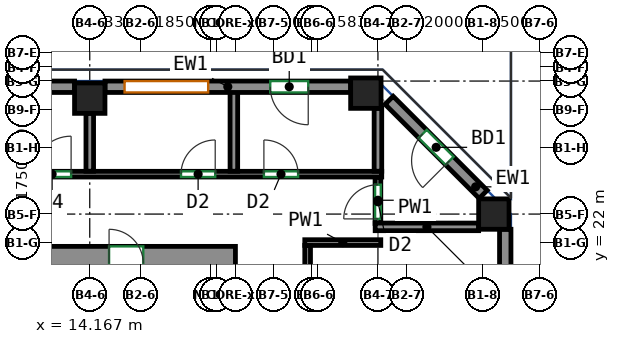
"""IFC4 building model, lengths in metres.
Left out: names, types, materials, properties, quantities, classifications, styles, units other than length and angle.
Written with IfcOpenShell. Run it as: python <this file> out.ifc"""

import sys

from ifc_helpers import new_model, si_unit, direction, frame, frame_2d, origin, origin_2d, place, context, subcontext, project, spatial, rectangle, extrude, source, transform, mapped, element, fill, save


model = new_model("IFC4")
c1 = context("Model", 3, precision=1e-05, world=origin(), true_north=direction((0.0, 1.0)))
c2 = subcontext(c1, "Body", "Model", "MODEL_VIEW")
j1 = project(units=[si_unit("LENGTHUNIT", "METRE"), si_unit("PLANEANGLEUNIT", "RADIAN")], contexts=[c1])
p1 = place(None, origin())
s1 = spatial("IfcSite", under=j1, at=p1, CompositionType="ELEMENT")
p2 = place(p1, origin())
s2 = spatial("IfcBuilding", under=s1, at=p2, CompositionType="ELEMENT")
p3 = place(p2, frame((0.0, 0.0, 168.5)))
s3 = spatial("IfcBuildingStorey", under=s2, at=p3, CompositionType="ELEMENT", Elevation=168.5)
m1 = source(origin(), c2, "Body", "SweptSolid", [
    extrude(rectangle(XDim=0.8, YDim=0.8, at=origin_2d()), origin(), (0.0, 0.0, 1.0), 3.12),
])
for number, where, z_axis, x_axis in (
    (1, (14.167, 25.8, 0.0), (0.0, 0.0, 1.0), (1.0, 0.0, 0.0)),
    (2, (21.432, 25.932, 0.0), (0.0, 0.0, 1.0), (1.0, 0.0, 0.0)),
    (3, (24.8, 22.75, 0.0), (0.0, 0.0, 1.0), (1.0, 0.0, 0.0)),
):
    element("IfcColumn", number, at=place(p3, frame(where, z_axis=z_axis, x_axis=x_axis)), inside=s3, PredefinedType="COLUMN", context=c2, shape_type="MappedRepresentation", body=[
        mapped(m1, transform((0.0, 0.0, 0.0))),
    ])
m2 = source(origin(), c2, "Body", "SweptSolid", [
    extrude(rectangle(XDim=33.9, YDim=0.9, at=frame_2d((16.95, 0.0))), origin(), (0.0, 0.0, 1.0), 3.12),
])
p4 = place(p3, frame((-15.9, 21.45, 0.0), z_axis=(0.0, 0.0, 1.0), x_axis=(1.0, 0.0, 0.0)))
e4 = element("IfcWall", 4, at=p4, inside=s3, PredefinedType="SHEAR", context=c2, shape_type="MappedRepresentation", body=[
    mapped(m2, transform((0.0, 0.0, 0.0))),
])
p5 = place(p4, frame((8.42, 0.0, 0.0)))
e5 = element("IfcOpeningElement", 5, at=p5, cuts=e4, PredefinedType="OPENING", context=c2, shape_type="SweptSolid", body=[
    extrude(rectangle(XDim=0.9, YDim=2.1, at=frame_2d((0.45, 1.05))), frame((0.0, 0.46, 0.0), z_axis=(0.0, -1.0, 0.0), x_axis=(1.0, 0.0, 0.0)), (0.0, 0.0, 1.0), 0.92),
])
p6 = place(p4, frame((15.12, 0.0, 0.0)))
e6 = element("IfcOpeningElement", 6, at=p6, cuts=e4, PredefinedType="OPENING", context=c2, shape_type="SweptSolid", body=[
    extrude(rectangle(XDim=0.9, YDim=2.1, at=frame_2d((0.45, 1.05))), frame((0.0, 0.46, 0.0), z_axis=(0.0, -1.0, 0.0), x_axis=(1.0, 0.0, 0.0)), (0.0, 0.0, 1.0), 0.92),
])
p7 = place(p4, frame((19.944, 0.0, 0.0)))
e7 = element("IfcOpeningElement", 7, at=p7, cuts=e4, PredefinedType="OPENING", context=c2, shape_type="SweptSolid", body=[
    extrude(rectangle(XDim=0.9, YDim=2.1, at=frame_2d((0.45, 1.05))), frame((0.0, 0.46, 0.0), z_axis=(0.0, -1.0, 0.0), x_axis=(1.0, 0.0, 0.0)), (0.0, 0.0, 1.0), 0.92),
])
p8 = place(p4, frame((25.304, 0.0, 0.0)))
e8 = element("IfcOpeningElement", 8, at=p8, cuts=e4, PredefinedType="OPENING", context=c2, shape_type="SweptSolid", body=[
    extrude(rectangle(XDim=0.9, YDim=2.1, at=frame_2d((0.45, 1.05))), frame((0.0, 0.46, 0.0), z_axis=(0.0, -1.0, 0.0), x_axis=(1.0, 0.0, 0.0)), (0.0, 0.0, 1.0), 0.92),
])
p9 = place(p4, frame((2.425, 0.0, 0.0)))
e9 = element("IfcOpeningElement", 9, at=p9, cuts=e4, PredefinedType="OPENING", context=c2, shape_type="SweptSolid", body=[
    extrude(rectangle(XDim=0.9, YDim=2.1, at=frame_2d((0.45, 1.05))), frame((0.0, 0.46, 0.0), z_axis=(0.0, -1.0, 0.0), x_axis=(1.0, 0.0, 0.0)), (0.0, 0.0, 1.0), 0.92),
])
p10 = place(p4, frame((30.575, 0.0, 0.0)))
e10 = element("IfcOpeningElement", 10, at=p10, cuts=e4, PredefinedType="OPENING", context=c2, shape_type="SweptSolid", body=[
    extrude(rectangle(XDim=0.9, YDim=2.1, at=frame_2d((0.45, 1.05))), frame((0.0, 0.46, 0.0), z_axis=(0.0, -1.0, 0.0), x_axis=(1.0, 0.0, 0.0)), (0.0, 0.0, 1.0), 0.92),
])
m3 = source(origin(), c2, "Body", "SweptSolid", [
    extrude(rectangle(XDim=13.95, YDim=0.3, at=frame_2d((6.975, 0.0))), origin(), (0.0, 0.0, 1.0), 3.12),
])
p11 = place(p3, frame((25.1, 8.4, 0.0), z_axis=(0.0, 0.0, 1.0), x_axis=(0.0, 1.0, 0.0)))
e11 = element("IfcWall", 11, at=p11, inside=s3, PredefinedType="SOLIDWALL", context=c2, shape_type="MappedRepresentation", body=[
    mapped(m3, transform((0.0, 0.0, 0.0))),
])
p12 = place(p11, frame((0.994, 0.0, 0.85)))
e12 = element("IfcOpeningElement", 12, at=p12, cuts=e11, PredefinedType="OPENING", context=c2, shape_type="SweptSolid", body=[
    extrude(rectangle(XDim=1.5, YDim=1.95, at=frame_2d((0.75, 0.975))), frame((0.0, 0.16, 0.0), z_axis=(0.0, -1.0, 0.0), x_axis=(1.0, 0.0, 0.0)), (0.0, 0.0, 1.0), 0.32),
])
p13 = place(p11, frame((4.481, 0.0, 0.85)))
e13 = element("IfcOpeningElement", 13, at=p13, cuts=e11, PredefinedType="OPENING", context=c2, shape_type="SweptSolid", body=[
    extrude(rectangle(XDim=1.5, YDim=1.95, at=frame_2d((0.75, 0.975))), frame((0.0, 0.16, 0.0), z_axis=(0.0, -1.0, 0.0), x_axis=(1.0, 0.0, 0.0)), (0.0, 0.0, 1.0), 0.32),
])
p14 = place(p11, frame((7.969, 0.0, 0.85)))
e14 = element("IfcOpeningElement", 14, at=p14, cuts=e11, PredefinedType="OPENING", context=c2, shape_type="SweptSolid", body=[
    extrude(rectangle(XDim=1.5, YDim=1.95, at=frame_2d((0.75, 0.975))), frame((0.0, 0.16, 0.0), z_axis=(0.0, -1.0, 0.0), x_axis=(1.0, 0.0, 0.0)), (0.0, 0.0, 1.0), 0.32),
])
p15 = place(p11, frame((11.456, 0.0, 0.85)))
e15 = element("IfcOpeningElement", 15, at=p15, cuts=e11, PredefinedType="OPENING", context=c2, shape_type="SweptSolid", body=[
    extrude(rectangle(XDim=1.5, YDim=1.95, at=frame_2d((0.75, 0.975))), frame((0.0, 0.16, 0.0), z_axis=(0.0, -1.0, 0.0), x_axis=(1.0, 0.0, 0.0)), (0.0, 0.0, 1.0), 0.32),
])
m4 = source(origin(), c2, "Body", "SweptSolid", [
    extrude(rectangle(XDim=3.5, YDim=0.3, at=frame_2d((1.75, 0.0))), origin(), (0.0, 0.0, 1.0), 3.12),
])
p16 = place(p3, frame((24.519, 23.269, 0.0), z_axis=(0.0, 0.0, 1.0), x_axis=(-0.70707190453, 0.707141656123, 0.0)))
e16 = element("IfcWall", 16, at=p16, inside=s3, PredefinedType="SOLIDWALL", context=c2, shape_type="MappedRepresentation", body=[
    mapped(m4, transform((0.0, 0.0, 0.0))),
])
p17 = place(p16, frame((1.25, 0.0, 0.0)))
e17 = element("IfcOpeningElement", 17, at=p17, cuts=e16, PredefinedType="OPENING", context=c2, shape_type="SweptSolid", body=[
    extrude(rectangle(XDim=1.0, YDim=2.1, at=frame_2d((0.5, 1.05))), frame((0.0, 0.16, 0.0), z_axis=(0.0, -1.0, 0.0), x_axis=(1.0, 0.0, 0.0)), (0.0, 0.0, 1.0), 0.32),
])
m5 = source(origin(), c2, "Body", "SweptSolid", [
    extrude(rectangle(XDim=6.465, YDim=0.3, at=frame_2d((3.232, 0.0))), origin(), (0.0, 0.0, 1.0), 3.12),
])
p18 = place(p3, frame((21.032, 26.1, 0.0), z_axis=(0.0, 0.0, 1.0), x_axis=(-1.0, 0.0, 0.0)))
e18 = element("IfcWall", 18, at=p18, inside=s3, PredefinedType="SOLIDWALL", context=c2, shape_type="MappedRepresentation", body=[
    mapped(m5, transform((0.0, 0.0, 0.0))),
])
p19 = place(p18, frame((1.116, 0.0, 0.0)))
e19 = element("IfcOpeningElement", 19, at=p19, cuts=e18, PredefinedType="OPENING", context=c2, shape_type="SweptSolid", body=[
    extrude(rectangle(XDim=1.0, YDim=2.1, at=frame_2d((0.5, 1.05))), frame((0.0, 0.16, 0.0), z_axis=(0.0, -1.0, 0.0), x_axis=(1.0, 0.0, 0.0)), (0.0, 0.0, 1.0), 0.32),
])
p20 = place(p18, frame((3.749, 0.0, 0.85)))
e20 = element("IfcOpeningElement", 20, at=p20, cuts=e18, PredefinedType="OPENING", context=c2, shape_type="SweptSolid", body=[
    extrude(rectangle(XDim=2.2, YDim=1.95, at=frame_2d((1.1, 0.975))), frame((0.0, 0.16, 0.0), z_axis=(0.0, -1.0, 0.0), x_axis=(1.0, 0.0, 0.0)), (0.0, 0.0, 1.0), 0.32),
])
m6 = source(origin(), c2, "Body", "SweptSolid", [
    extrude(rectangle(XDim=6.783, YDim=0.3, at=frame_2d((3.392, 0.0))), origin(), (0.0, 0.0, 1.0), 3.12),
])
p21 = place(p3, frame((13.767, 26.1, 0.0), z_axis=(0.0, 0.0, 1.0), x_axis=(-1.0, 0.0, 0.0)))
e21 = element("IfcWall", 21, at=p21, inside=s3, PredefinedType="SOLIDWALL", context=c2, shape_type="MappedRepresentation", body=[
    mapped(m6, transform((0.0, 0.0, 0.0))),
])
p22 = place(p21, frame((1.196, 0.0, 0.0)))
e22 = element("IfcOpeningElement", 22, at=p22, cuts=e21, PredefinedType="OPENING", context=c2, shape_type="SweptSolid", body=[
    extrude(rectangle(XDim=1.0, YDim=2.1, at=frame_2d((0.5, 1.05))), frame((0.0, 0.16, 0.0), z_axis=(0.0, -1.0, 0.0), x_axis=(1.0, 0.0, 0.0)), (0.0, 0.0, 1.0), 0.32),
])
p23 = place(p21, frame((3.988, 0.0, 0.85)))
e23 = element("IfcOpeningElement", 23, at=p23, cuts=e21, PredefinedType="OPENING", context=c2, shape_type="SweptSolid", body=[
    extrude(rectangle(XDim=2.2, YDim=1.95, at=frame_2d((1.1, 0.975))), frame((0.0, 0.16, 0.0), z_axis=(0.0, -1.0, 0.0), x_axis=(1.0, 0.0, 0.0)), (0.0, 0.0, 1.0), 0.32),
])
p24 = place(p3, frame((19.825, 22.0, 0.0), z_axis=(0.0, 0.0, 1.0), x_axis=(1.0, 0.0, 0.0)))
e24 = element("IfcWall", 24, at=p24, inside=s3, PredefinedType="PARTITIONING", context=c2, shape_type="SweptSolid", body=[
    extrude(rectangle(XDim=2.0, YDim=0.15, at=frame_2d((1.0, 0.0))), origin(), (0.0, 0.0, 1.0), 3.12),
])
p25 = place(p3, frame((19.9, 17.75, 0.0), z_axis=(0.0, 0.0, 1.0), x_axis=(0.0, 1.0, 0.0)))
e25 = element("IfcWall", 25, at=p25, inside=s3, PredefinedType="PARTITIONING", context=c2, shape_type="SweptSolid", body=[
    extrude(rectangle(XDim=4.175, YDim=0.15, at=frame_2d((2.087, 0.0))), origin(), (0.0, 0.0, 1.0), 3.12),
])
p26 = place(p25, frame((1.432, 0.0, 0.0)))
e26 = element("IfcOpeningElement", 26, at=p26, cuts=e25, PredefinedType="OPENING", context=c2, shape_type="SweptSolid", body=[
    extrude(rectangle(XDim=0.9, YDim=2.1, at=frame_2d((0.45, 1.05))), frame((0.0, 0.085, 0.0), z_axis=(0.0, -1.0, 0.0), x_axis=(1.0, 0.0, 0.0)), (0.0, 0.0, 1.0), 0.17),
])
p27 = place(p3, frame((21.75, 22.503, 0.0), z_axis=(0.0, 0.0, 1.0), x_axis=(0.0, 1.0, 0.0)))
e27 = element("IfcWall", 27, at=p27, inside=s3, PredefinedType="PARTITIONING", context=c2, shape_type="SweptSolid", body=[
    extrude(rectangle(XDim=1.222, YDim=0.15, at=frame_2d((0.611, 0.0))), origin(), (0.0, 0.0, 1.0), 3.12),
])
p28 = place(p27, frame((0.12, 0.0, 0.0)))
e28 = element("IfcOpeningElement", 28, at=p28, cuts=e27, PredefinedType="OPENING", context=c2, shape_type="SweptSolid", body=[
    extrude(rectangle(XDim=0.9, YDim=2.1, at=frame_2d((0.45, 1.05))), frame((0.0, 0.085, 0.0), z_axis=(0.0, -1.0, 0.0), x_axis=(1.0, 0.0, 0.0)), (0.0, 0.0, 1.0), 0.17),
])
p29 = place(p3, frame((-20.059, 23.8, 0.0), z_axis=(0.0, 0.0, 1.0), x_axis=(1.0, 0.0, 0.0)))
e29 = element("IfcWall", 29, at=p29, inside=s3, PredefinedType="PARTITIONING", context=c2, shape_type="SweptSolid", body=[
    extrude(rectangle(XDim=41.909, YDim=0.15, at=frame_2d((20.955, 0.0))), origin(), (0.0, 0.0, 1.0), 3.12),
])
p30 = place(p29, frame((2.101, 0.0, 0.0)))
e30 = element("IfcOpeningElement", 30, at=p30, cuts=e29, PredefinedType="OPENING", context=c2, shape_type="SweptSolid", body=[
    extrude(rectangle(XDim=0.9, YDim=2.1, at=frame_2d((0.45, 1.05))), frame((0.0, 0.085, 0.0), z_axis=(0.0, -1.0, 0.0), x_axis=(1.0, 0.0, 0.0)), (0.0, 0.0, 1.0), 0.17),
])
p31 = place(p29, frame((4.585, 0.0, 0.0)))
e31 = element("IfcOpeningElement", 31, at=p31, cuts=e29, PredefinedType="OPENING", context=c2, shape_type="SweptSolid", body=[
    extrude(rectangle(XDim=1.0, YDim=2.1, at=frame_2d((0.5, 1.05))), frame((0.0, 0.085, 0.0), z_axis=(0.0, -1.0, 0.0), x_axis=(1.0, 0.0, 0.0)), (0.0, 0.0, 1.0), 0.17),
])
p32 = place(p29, frame((8.175, 0.0, 0.0)))
e32 = element("IfcOpeningElement", 32, at=p32, cuts=e29, PredefinedType="OPENING", context=c2, shape_type="SweptSolid", body=[
    extrude(rectangle(XDim=0.9, YDim=2.1, at=frame_2d((0.45, 1.05))), frame((0.0, 0.085, 0.0), z_axis=(0.0, -1.0, 0.0), x_axis=(1.0, 0.0, 0.0)), (0.0, 0.0, 1.0), 0.17),
])
p33 = place(p29, frame((13.173, 0.0, 0.0)))
e33 = element("IfcOpeningElement", 33, at=p33, cuts=e29, PredefinedType="OPENING", context=c2, shape_type="SweptSolid", body=[
    extrude(rectangle(XDim=1.0, YDim=2.1, at=frame_2d((0.5, 1.05))), frame((0.0, 0.085, 0.0), z_axis=(0.0, -1.0, 0.0), x_axis=(1.0, 0.0, 0.0)), (0.0, 0.0, 1.0), 0.17),
])
p34 = place(p29, frame((15.658, 0.0, 0.0)))
e34 = element("IfcOpeningElement", 34, at=p34, cuts=e29, PredefinedType="OPENING", context=c2, shape_type="SweptSolid", body=[
    extrude(rectangle(XDim=0.9, YDim=2.1, at=frame_2d((0.45, 1.05))), frame((0.0, 0.085, 0.0), z_axis=(0.0, -1.0, 0.0), x_axis=(1.0, 0.0, 0.0)), (0.0, 0.0, 1.0), 0.17),
])
p35 = place(p29, frame((21.315, 0.0, 0.0)))
e35 = element("IfcOpeningElement", 35, at=p35, cuts=e29, PredefinedType="OPENING", context=c2, shape_type="SweptSolid", body=[
    extrude(rectangle(XDim=0.9, YDim=2.1, at=frame_2d((0.45, 1.05))), frame((0.0, 0.085, 0.0), z_axis=(0.0, -1.0, 0.0), x_axis=(1.0, 0.0, 0.0)), (0.0, 0.0, 1.0), 0.17),
])
p36 = place(p29, frame((24.625, 0.0, 0.0)))
e36 = element("IfcOpeningElement", 36, at=p36, cuts=e29, PredefinedType="OPENING", context=c2, shape_type="SweptSolid", body=[
    extrude(rectangle(XDim=1.0, YDim=2.1, at=frame_2d((0.5, 1.05))), frame((0.0, 0.085, 0.0), z_axis=(0.0, -1.0, 0.0), x_axis=(1.0, 0.0, 0.0)), (0.0, 0.0, 1.0), 0.17),
])
p37 = place(p29, frame((29.043, 0.0, 0.0)))
e37 = element("IfcOpeningElement", 37, at=p37, cuts=e29, PredefinedType="OPENING", context=c2, shape_type="SweptSolid", body=[
    extrude(rectangle(XDim=0.9, YDim=2.1, at=frame_2d((0.45, 1.05))), frame((0.0, 0.085, 0.0), z_axis=(0.0, -1.0, 0.0), x_axis=(1.0, 0.0, 0.0)), (0.0, 0.0, 1.0), 0.17),
])
p38 = place(p29, frame((32.735, 0.0, 0.0)))
e38 = element("IfcOpeningElement", 38, at=p38, cuts=e29, PredefinedType="OPENING", context=c2, shape_type="SweptSolid", body=[
    extrude(rectangle(XDim=1.0, YDim=2.1, at=frame_2d((0.5, 1.05))), frame((0.0, 0.085, 0.0), z_axis=(0.0, -1.0, 0.0), x_axis=(1.0, 0.0, 0.0)), (0.0, 0.0, 1.0), 0.17),
])
p39 = place(p29, frame((36.627, 0.0, 0.0)))
e39 = element("IfcOpeningElement", 39, at=p39, cuts=e29, PredefinedType="OPENING", context=c2, shape_type="SweptSolid", body=[
    extrude(rectangle(XDim=0.9, YDim=2.1, at=frame_2d((0.45, 1.05))), frame((0.0, 0.085, 0.0), z_axis=(0.0, -1.0, 0.0), x_axis=(1.0, 0.0, 0.0)), (0.0, 0.0, 1.0), 0.17),
])
p40 = place(p29, frame((38.808, 0.0, 0.0)))
e40 = element("IfcOpeningElement", 40, at=p40, cuts=e29, PredefinedType="OPENING", context=c2, shape_type="SweptSolid", body=[
    extrude(rectangle(XDim=0.9, YDim=2.1, at=frame_2d((0.45, 1.05))), frame((0.0, 0.085, 0.0), z_axis=(0.0, -1.0, 0.0), x_axis=(1.0, 0.0, 0.0)), (0.0, 0.0, 1.0), 0.17),
])
p41 = place(p3, frame((24.4, 22.413, 0.0), z_axis=(0.0, 0.0, 1.0), x_axis=(-1.0, 0.0, 0.0)))
e41 = element("IfcWall", 41, at=p41, inside=s3, PredefinedType="PARTITIONING", context=c2, shape_type="SweptSolid", body=[
    extrude(rectangle(XDim=2.723, YDim=0.2, at=frame_2d((1.361, 0.0))), origin(), (0.0, 0.0, 1.0), 2.52),
])
p42 = place(p3, frame((21.75, 25.532, 0.0), z_axis=(0.0, 0.0, 1.0), x_axis=(0.0, -1.0, 0.0)))
e42 = element("IfcWall", 42, at=p42, inside=s3, PredefinedType="PARTITIONING", context=c2, shape_type="SweptSolid", body=[
    extrude(rectangle(XDim=1.655, YDim=0.2, at=frame_2d((0.828, 0.0))), origin(), (0.0, 0.0, 1.0), 3.12),
])
p43 = place(p3, frame((14.167, 23.877, 0.0), z_axis=(0.0, 0.0, 1.0), x_axis=(0.0, 1.0, 0.0)))
e43 = element("IfcWall", 43, at=p43, inside=s3, PredefinedType="PARTITIONING", context=c2, shape_type="SweptSolid", body=[
    extrude(rectangle(XDim=1.523, YDim=0.2, at=frame_2d((0.761, 0.0))), origin(), (0.0, 0.0, 1.0), 3.12),
])
p44 = place(p3, frame((17.959, 23.877, 0.0), z_axis=(0.0, 0.0, 1.0), x_axis=(0.0, 1.0, 0.0)))
e44 = element("IfcWall", 44, at=p44, inside=s3, PredefinedType="PARTITIONING", context=c2, shape_type="SweptSolid", body=[
    extrude(rectangle(XDim=2.123, YDim=0.2, at=frame_2d((1.062, 0.0))), origin(), (0.0, 0.0, 1.0), 3.12),
])
p45 = place(p17, origin())
e45 = element("IfcDoor", 45, at=p45, inside=s3, OperationType="SINGLE_SWING_LEFT", PredefinedType="DOOR", context=c2, shape_type="SweptSolid", body=[
    extrude(rectangle(XDim=1.0, YDim=2.1, at=frame_2d((0.5, 1.05))), frame((0.0, 0.025, 0.0), z_axis=(0.0, -1.0, 0.0), x_axis=(1.0, 0.0, 0.0)), (0.0, 0.0, 1.0), 0.05),
])
fill(e17, e45)
p46 = place(p19, origin())
e46 = element("IfcDoor", 46, at=p46, inside=s3, OperationType="SINGLE_SWING_LEFT", PredefinedType="DOOR", context=c2, shape_type="SweptSolid", body=[
    extrude(rectangle(XDim=1.0, YDim=2.1, at=frame_2d((0.5, 1.05))), frame((0.0, 0.025, 0.0), z_axis=(0.0, -1.0, 0.0), x_axis=(1.0, 0.0, 0.0)), (0.0, 0.0, 1.0), 0.05),
])
fill(e19, e46)
p47 = place(p20, origin())
e47 = element("IfcWindow", 47, at=p47, inside=s3, PartitioningType="SINGLE_PANEL", PredefinedType="WINDOW", context=c2, shape_type="SweptSolid", body=[
    extrude(rectangle(XDim=2.2, YDim=1.95, at=frame_2d((1.1, 0.975))), frame((0.0, 0.03, 0.0), z_axis=(0.0, -1.0, 0.0), x_axis=(1.0, 0.0, 0.0)), (0.0, 0.0, 1.0), 0.06),
])
fill(e20, e47)
p48 = place(p28, origin())
e48 = element("IfcDoor", 48, at=p48, inside=s3, OperationType="SINGLE_SWING_LEFT", PredefinedType="DOOR", context=c2, shape_type="SweptSolid", body=[
    extrude(rectangle(XDim=0.9, YDim=2.1, at=frame_2d((0.45, 1.05))), frame((0.0, 0.025, 0.0), z_axis=(0.0, -1.0, 0.0), x_axis=(1.0, 0.0, 0.0)), (0.0, 0.0, 1.0), 0.05),
])
fill(e28, e48)
p49 = place(p38, origin())
e49 = element("IfcDoor", 49, at=p49, inside=s3, OperationType="SINGLE_SWING_RIGHT", PredefinedType="DOOR", context=c2, shape_type="SweptSolid", body=[
    extrude(rectangle(XDim=1.0, YDim=2.1, at=frame_2d((0.5, 1.05))), frame((0.0, 0.025, 0.0), z_axis=(0.0, -1.0, 0.0), x_axis=(1.0, 0.0, 0.0)), (0.0, 0.0, 1.0), 0.05),
])
fill(e38, e49)
p50 = place(p39, origin())
e50 = element("IfcDoor", 50, at=p50, inside=s3, OperationType="SINGLE_SWING_RIGHT", PredefinedType="DOOR", context=c2, shape_type="SweptSolid", body=[
    extrude(rectangle(XDim=0.9, YDim=2.1, at=frame_2d((0.45, 1.05))), frame((0.0, 0.025, 0.0), z_axis=(0.0, -1.0, 0.0), x_axis=(1.0, 0.0, 0.0)), (0.0, 0.0, 1.0), 0.05),
])
fill(e39, e50)
p51 = place(p40, origin())
e51 = element("IfcDoor", 51, at=p51, inside=s3, OperationType="SINGLE_SWING_LEFT", PredefinedType="DOOR", context=c2, shape_type="SweptSolid", body=[
    extrude(rectangle(XDim=0.9, YDim=2.1, at=frame_2d((0.45, 1.05))), frame((0.0, 0.025, 0.0), z_axis=(0.0, -1.0, 0.0), x_axis=(1.0, 0.0, 0.0)), (0.0, 0.0, 1.0), 0.05),
])
fill(e40, e51)
save(model, sys.argv[1])
